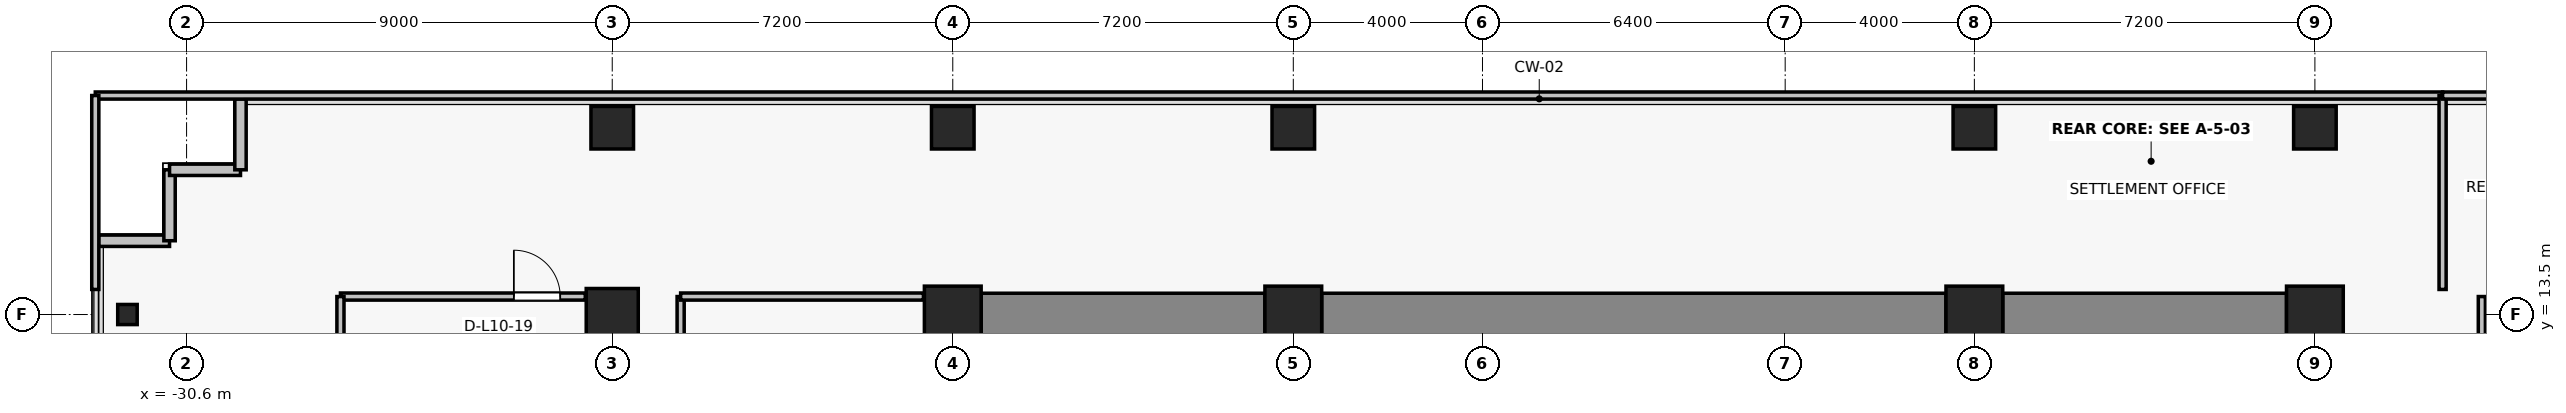
"""IFC4 building model, lengths in metres.
Left out: names, types, materials, properties, quantities, classifications, styles, units other than length and angle.
Written with IfcOpenShell. Run it as: python <this file> out.ifc"""

import sys

from ifc_helpers import new_model, si_unit, direction, frame, frame_2d, origin, origin_2d, place, context, subcontext, project, spatial, rectangle, i_section, extrude, source, transform, mapped, element, fill, save


model = new_model("IFC4")
c1 = context("Model", 3, precision=1e-05, world=origin(), true_north=direction((0.0, 1.0)))
c2 = subcontext(c1, "Body", "Model", "MODEL_VIEW")
j1 = project(units=[si_unit("LENGTHUNIT", "METRE"), si_unit("PLANEANGLEUNIT", "RADIAN")], contexts=[c1])
p1 = place(None, origin())
s1 = spatial("IfcSite", under=j1, at=p1, CompositionType="ELEMENT")
p2 = place(p1, origin())
s2 = spatial("IfcBuilding", under=s1, at=p2, CompositionType="ELEMENT")
p3 = place(p2, frame((0.0, 0.0, 40.6)))
s3 = spatial("IfcBuildingStorey", under=s2, at=p3, CompositionType="ELEMENT", Elevation=40.6)
for number, where, z_axis, x_axis in (
    (1, (-14.4, 13.5, 0.0), (0.0, 0.0, 1.0), (1.0, 0.0, 0.0)),
    (2, (-7.2, 13.5, 0.0), (0.0, 0.0, 1.0), (1.0, 0.0, 0.0)),
    (3, (7.2, 13.5, 0.0), (0.0, 0.0, 1.0), (1.0, 0.0, 0.0)),
    (4, (14.4, 13.5, 0.0), (0.0, 0.0, 1.0), (1.0, 0.0, 0.0)),
):
    element("IfcColumn", number, at=place(p3, frame(where, z_axis=z_axis, x_axis=x_axis)), inside=s3, PredefinedType="COLUMN", context=c2, shape_type="SweptSolid", body=[
        extrude(rectangle(XDim=1.2, YDim=1.2, at=origin_2d()), origin(), (0.0, 0.0, 1.0), 3.3),
    ])
p4 = place(p3, frame((-21.6, 13.5, 0.0), z_axis=(0.0, 0.0, 1.0), x_axis=(1.0, 0.0, 0.0)))
e5 = element("IfcColumn", 5, at=p4, inside=s3, PredefinedType="COLUMN", context=c2, shape_type="SweptSolid", body=[
    extrude(rectangle(XDim=1.1, YDim=1.1, at=origin_2d()), origin(), (0.0, 0.0, 1.0), 3.3),
])
for number, where, z_axis, x_axis in (
    (6, (-14.4, 17.45, 0.0), (0.0, 0.0, 1.0), (1.0, 0.0, 0.0)),
    (7, (-7.2, 17.45, 0.0), (0.0, 0.0, 1.0), (1.0, 0.0, 0.0)),
    (8, (7.2, 17.45, 0.0), (0.0, 0.0, 1.0), (1.0, 0.0, 0.0)),
    (9, (14.4, 17.45, 0.0), (0.0, 0.0, 1.0), (1.0, 0.0, 0.0)),
    (10, (-21.6, 17.45, 0.0), (0.0, 0.0, 1.0), (1.0, 0.0, 0.0)),
):
    element("IfcColumn", number, at=place(p3, frame(where, z_axis=z_axis, x_axis=x_axis)), inside=s3, PredefinedType="COLUMN", context=c2, shape_type="SweptSolid", body=[
        extrude(rectangle(XDim=0.9, YDim=0.9, at=origin_2d()), origin(), (0.0, 0.0, 1.0), 3.3),
    ])
p5 = place(p3, frame((-31.85, 13.5, 0.0), z_axis=(0.0, 0.0, 1.0), x_axis=(1.0, 0.0, 0.0)))
e11 = element("IfcColumn", 11, at=p5, inside=s3, PredefinedType="COLUMN", context=c2, shape_type="SweptSolid", body=[
    extrude(i_section(OverallWidth=0.412, OverallDepth=0.425, WebThickness=0.026, FlangeThickness=0.039, FilletRadius=0.015, at=origin_2d()), origin(), (0.0, 0.0, 1.0), 3.3),
])
p6 = place(p3, frame((-13.8, 13.5, 0.0), z_axis=(0.0, 0.0, 1.0), x_axis=(1.0, 0.0, 0.0)))
e12 = element("IfcWall", 12, at=p6, inside=s3, PredefinedType="SHEAR", context=c2, shape_type="SweptSolid", body=[
    extrude(rectangle(XDim=6.0, YDim=0.9, at=frame_2d((3.0, 0.0))), origin(), (0.0, 0.0, 1.0), 3.075),
])
p7 = place(p3, frame((-6.6, 13.5, 0.0), z_axis=(0.0, 0.0, 1.0), x_axis=(1.0, 0.0, 0.0)))
e13 = element("IfcWall", 13, at=p7, inside=s3, PredefinedType="SHEAR", context=c2, shape_type="SweptSolid", body=[
    extrude(rectangle(XDim=13.2, YDim=0.9, at=frame_2d((6.6, 0.0))), origin(), (0.0, 0.0, 1.0), 3.075),
])
p8 = place(p3, frame((7.8, 13.5, 0.0), z_axis=(0.0, 0.0, 1.0), x_axis=(1.0, 0.0, 0.0)))
e14 = element("IfcWall", 14, at=p8, inside=s3, PredefinedType="SHEAR", context=c2, shape_type="SweptSolid", body=[
    extrude(rectangle(XDim=6.0, YDim=0.9, at=frame_2d((3.0, 0.0))), origin(), (0.0, 0.0, 1.0), 3.075),
])
for number, where, z_axis, x_axis in (
    (15, (-30.96, 15.06, 0.0), (0.0, 0.0, 1.0), (-1.0, 0.0, 0.0)),
    (16, (-30.96, 16.56, 0.0), (0.0, 0.0, 1.0), (0.0, -1.0, 0.0)),
    (17, (-29.46, 16.56, 0.0), (0.0, 0.0, 1.0), (-1.0, 0.0, 0.0)),
    (18, (-29.46, 18.06, 0.0), (0.0, 0.0, 1.0), (0.0, -1.0, 0.0)),
):
    element("IfcWall", number, at=place(p3, frame(where, z_axis=z_axis, x_axis=x_axis)), inside=s3, PredefinedType="SOLIDWALL", context=c2, shape_type="SweptSolid", body=[
        extrude(rectangle(XDim=1.5, YDim=0.24, at=frame_2d((0.75, 0.0))), origin(), (0.0, 0.0, 1.0), 3.075),
    ])
p9 = place(p3, frame((-27.346, 13.88, 0.0), z_axis=(0.0, 0.0, 1.0), x_axis=(1.0, 0.0, 0.0)))
e19 = element("IfcWall", 19, at=p9, inside=s3, PredefinedType="PARTITIONING", context=c2, shape_type="SweptSolid", body=[
    extrude(rectangle(XDim=5.177, YDim=0.15, at=frame_2d((2.588, 0.0))), origin(), (0.0, 0.0, 1.0), 3.075),
])
p10 = place(p9, frame((3.667, 0.0, 0.0)))
e20 = element("IfcOpeningElement", 20, at=p10, cuts=e19, PredefinedType="OPENING", context=c2, shape_type="SweptSolid", body=[
    extrude(rectangle(XDim=0.98, YDim=2.15, at=frame_2d((0.49, 1.075))), frame((0.0, 0.085, 0.0), z_axis=(0.0, -1.0, 0.0), x_axis=(1.0, 0.0, 0.0)), (0.0, 0.0, 1.0), 0.17),
])
for number, where, z_axis, x_axis in (
    (21, (-27.346, -1.77, 0.0), (0.0, 0.0, 1.0), (0.0, 1.0, 0.0)),
    (22, (-20.154, 13.88, 0.0), (0.0, 0.0, 1.0), (0.0, -1.0, 0.0)),
):
    element("IfcWall", number, at=place(p3, frame(where, z_axis=z_axis, x_axis=x_axis)), inside=s3, PredefinedType="PARTITIONING", context=c2, shape_type="SweptSolid", body=[
        extrude(rectangle(XDim=15.65, YDim=0.15, at=frame_2d((7.825, 0.0))), origin(), (0.0, 0.0, 1.0), 2.465),
    ])
p11 = place(p3, frame((-20.154, 13.88, 0.0), z_axis=(0.0, 0.0, 1.0), x_axis=(1.0, 0.0, 0.0)))
e23 = element("IfcWall", 23, at=p11, inside=s3, PredefinedType="PARTITIONING", context=c2, shape_type="SweptSolid", body=[
    extrude(rectangle(XDim=5.134, YDim=0.15, at=frame_2d((2.567, 0.0))), origin(), (0.0, 0.0, 1.0), 3.075),
])
p12 = place(p3, frame((17.93, 7.333, 0.0), z_axis=(0.0, 0.0, 1.0), x_axis=(0.0, 1.0, 0.0)))
e24 = element("IfcWall", 24, at=p12, inside=s3, PredefinedType="PARTITIONING", context=c2, shape_type="SweptSolid", body=[
    extrude(rectangle(XDim=6.547, YDim=0.15, at=frame_2d((3.274, 0.0))), origin(), (0.0, 0.0, 1.0), 2.465),
])
p13 = place(p12, frame((2.783, 0.0, 0.0)))
e25 = element("IfcOpeningElement", 25, at=p13, cuts=e24, PredefinedType="OPENING", context=c2, shape_type="SweptSolid", body=[
    extrude(rectangle(XDim=0.98, YDim=2.15, at=frame_2d((0.49, 1.075))), frame((0.0, 0.085, 0.0), z_axis=(0.0, -1.0, 0.0), x_axis=(1.0, 0.0, 0.0)), (0.0, 0.0, 1.0), 0.17),
])
p14 = place(p3, frame((-32.53, 18.13, 0.0), z_axis=(0.0, 0.0, 1.0), x_axis=(1.0, 0.0, 0.0)))
e26 = element("IfcWall", 26, at=p14, inside=s3, PredefinedType="PARTITIONING", context=c2, shape_type="SweptSolid", body=[
    extrude(rectangle(XDim=49.63, YDim=0.15, at=frame_2d((24.815, 0.0))), origin(), (0.0, 0.0, 1.0), 3.075),
])
p15 = place(p3, frame((-32.53, 14.03, 0.0), z_axis=(0.0, 0.0, 1.0), x_axis=(0.0, 1.0, 0.0)))
e27 = element("IfcWall", 27, at=p15, inside=s3, PredefinedType="PARTITIONING", context=c2, shape_type="SweptSolid", body=[
    extrude(rectangle(XDim=4.1, YDim=0.15, at=frame_2d((2.05, 0.0))), origin(), (0.0, 0.0, 1.0), 3.075),
])
p16 = place(p3, frame((17.1, 18.13, 0.0), z_axis=(0.0, 0.0, 1.0), x_axis=(0.0, -1.0, 0.0)))
e28 = element("IfcWall", 28, at=p16, inside=s3, PredefinedType="PARTITIONING", context=c2, shape_type="SweptSolid", body=[
    extrude(rectangle(XDim=4.1, YDim=0.15, at=frame_2d((2.05, 0.0))), origin(), (0.0, 0.0, 1.0), 2.465),
])
p17 = place(p3, frame((17.1, 18.13, 0.0), z_axis=(0.0, 0.0, 1.0), x_axis=(1.0, 0.0, 0.0)))
e29 = element("IfcWall", 29, at=p17, inside=s3, PredefinedType="PARTITIONING", context=c2, shape_type="SweptSolid", body=[
    extrude(rectangle(XDim=11.43, YDim=0.15, at=frame_2d((5.715, 0.0))), origin(), (0.0, 0.0, 1.0), 3.075),
])
m1 = source(origin(), c2, "Body", "SweptSolid", [
    extrude(rectangle(XDim=0.98, YDim=2.15, at=frame_2d((0.49, 1.075))), frame((0.0, 0.025, 0.0), z_axis=(0.0, -1.0, 0.0), x_axis=(1.0, 0.0, 0.0)), (0.0, 0.0, 1.0), 0.05),
])
p18 = place(p10, origin())
e30 = element("IfcDoor", 30, at=p18, inside=s3, OperationType="SINGLE_SWING_LEFT", PredefinedType="DOOR", context=c2, shape_type="MappedRepresentation", body=[
    mapped(m1, transform((0.0, 0.0, 0.0), x_axis=(1.0, 0.0, 0.0), y_axis=(0.0, 1.0, 0.0), z_axis=(0.0, 0.0, 1.0), scale=1.0)),
])
fill(e20, e30)
save(model, sys.argv[1])
